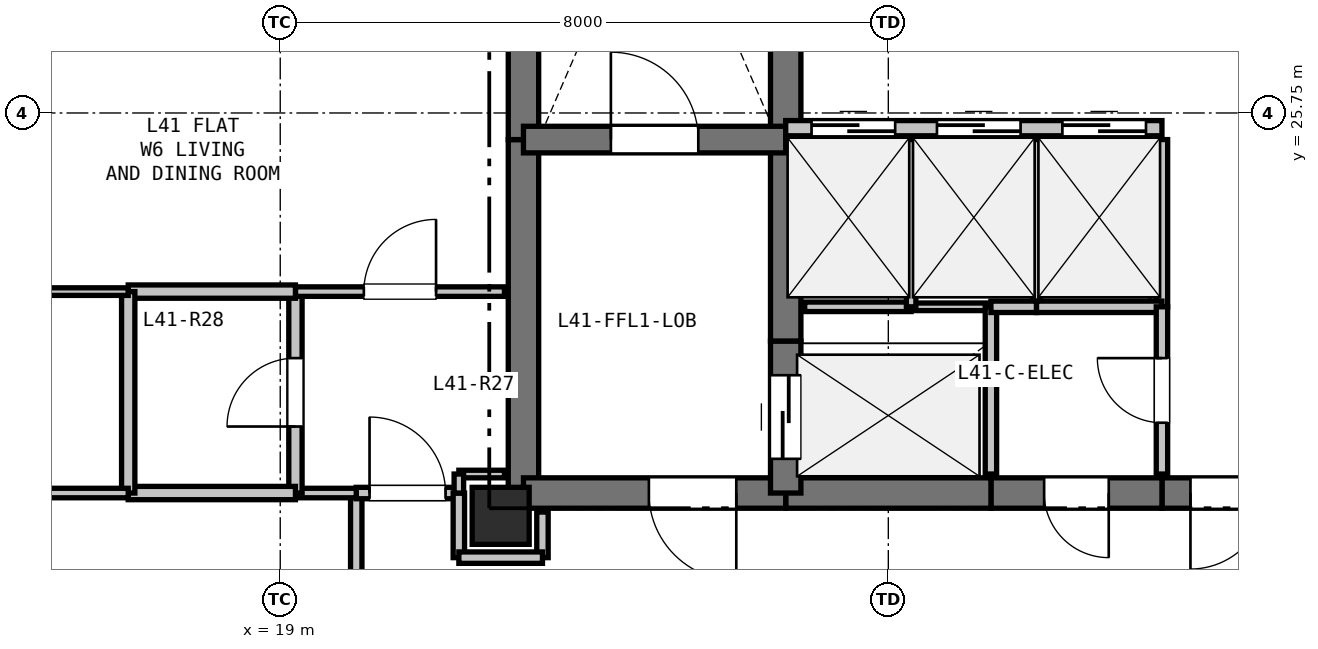
"""IFC4 building model, lengths in metres.
Left out: names, types, materials, properties, quantities, classifications, styles, units other than length and angle.
Written with IfcOpenShell. Run it as: python <this file> out.ifc"""

import sys

from ifc_helpers import new_model, si_unit, direction, frame, frame_2d, origin, origin_2d, place, context, subcontext, project, spatial, rectangle, extrude, element, fill, save


model = new_model("IFC4")
c1 = context("Model", 3, precision=1e-05, world=origin(), true_north=direction((0.0, 1.0)))
c2 = subcontext(c1, "Body", "Model", "MODEL_VIEW")
j1 = project(units=[si_unit("LENGTHUNIT", "METRE"), si_unit("PLANEANGLEUNIT", "RADIAN")], contexts=[c1])
p1 = place(None, origin())
s1 = spatial("IfcSite", under=j1, at=p1, CompositionType="ELEMENT")
p2 = place(p1, origin())
s2 = spatial("IfcBuilding", under=s1, at=p2, CompositionType="ELEMENT")
p3 = place(p2, frame((0.0, 0.0, 147.6)))
s3 = spatial("IfcBuildingStorey", under=s2, at=p3, CompositionType="ELEMENT", Elevation=147.6)
p4 = place(p3, frame((21.9, 20.45, 0.0), z_axis=(0.0, 0.0, 1.0), x_axis=(1.0, 0.0, 0.0)))
e1 = element("IfcColumn", 1, at=p4, inside=s3, PredefinedType="COLUMN", context=c2, shape_type="SweptSolid", body=[
    extrude(rectangle(XDim=0.75, YDim=0.75, at=origin_2d()), origin(), (0.0, 0.0, 1.0), 3.3),
])
p5 = place(p3, frame((16.378, 18.773, 0.0), z_axis=(0.0, 0.0, 1.0), x_axis=(-0.866027848477, 0.499995765644, 0.0)))
e2 = element("IfcWall", 2, at=p5, inside=s3, PredefinedType="SOLIDWALL", context=c2, shape_type="SweptSolid", body=[
    extrude(rectangle(XDim=11.186, YDim=0.25, at=frame_2d((5.593, 0.0))), origin(), (0.0, 0.0, 1.0), 2.68),
])
p6 = place(p5, frame((6.757, 0.0, 0.9)))
e3 = element("IfcOpeningElement", 3, at=p6, cuts=e2, PredefinedType="OPENING", context=c2, shape_type="SweptSolid", body=[
    extrude(rectangle(XDim=1.2, YDim=1.4, at=frame_2d((0.6, 0.7))), frame((0.0, 0.135, 0.0), z_axis=(0.0, -1.0, 0.0), x_axis=(1.0, 0.0, 0.0)), (0.0, 0.0, 1.0), 0.27),
])
p7 = place(p3, frame((22.2, 20.75, 0.0), z_axis=(0.0, 0.0, 1.0), x_axis=(0.0, 1.0, 0.0)))
e4 = element("IfcWall", 4, at=p7, inside=s3, PredefinedType="SHEAR", context=c2, shape_type="SweptSolid", body=[
    extrude(rectangle(XDim=4.65, YDim=0.4, at=frame_2d((2.325, 0.0))), origin(), (0.0, 0.0, 1.0), 3.06),
])
p8 = place(p3, frame((22.2, 25.4, 0.0), z_axis=(0.0, 0.0, 1.0), x_axis=(0.0, 1.0, 0.0)))
e5 = element("IfcWall", 5, at=p8, inside=s3, PredefinedType="SHEAR", context=c2, shape_type="SweptSolid", body=[
    extrude(rectangle(XDim=7.35, YDim=0.4, at=frame_2d((3.675, 0.0))), origin(), (0.0, 0.0, 1.0), 3.06),
])
p9 = place(p3, frame((32.35, 20.75, 0.0), z_axis=(0.0, 0.0, 1.0), x_axis=(-1.0, 0.0, 0.0)))
e6 = element("IfcWall", 6, at=p9, inside=s3, PredefinedType="SHEAR", context=c2, shape_type="SweptSolid", body=[
    extrude(rectangle(XDim=1.75, YDim=0.4, at=frame_2d((0.875, 0.0))), origin(), (0.0, 0.0, 1.0), 3.06),
])
p10 = place(p9, frame((0.375, 0.0, 0.0)))
e7 = element("IfcOpeningElement", 7, at=p10, cuts=e6, PredefinedType="OPENING", context=c2, shape_type="SweptSolid", body=[
    extrude(rectangle(XDim=1.0, YDim=2.15, at=frame_2d((0.5, 1.075))), frame((0.0, 0.21, 0.0), z_axis=(0.0, -1.0, 0.0), x_axis=(1.0, 0.0, 0.0)), (0.0, 0.0, 1.0), 0.42),
])
p11 = place(p3, frame((30.6, 20.75, 0.0), z_axis=(0.0, 0.0, 1.0), x_axis=(-1.0, 0.0, 0.0)))
e8 = element("IfcWall", 8, at=p11, inside=s3, PredefinedType="SHEAR", context=c2, shape_type="SweptSolid", body=[
    extrude(rectangle(XDim=2.25, YDim=0.4, at=frame_2d((1.125, 0.0))), origin(), (0.0, 0.0, 1.0), 3.06),
])
p12 = place(p11, frame((0.7, 0.0, 0.0)))
e9 = element("IfcOpeningElement", 9, at=p12, cuts=e8, PredefinedType="OPENING", context=c2, shape_type="SweptSolid", body=[
    extrude(rectangle(XDim=0.85, YDim=2.1, at=frame_2d((0.425, 1.05))), frame((0.0, 0.21, 0.0), z_axis=(0.0, -1.0, 0.0), x_axis=(1.0, 0.0, 0.0)), (0.0, 0.0, 1.0), 0.42),
])
p13 = place(p3, frame((28.35, 20.75, 0.0), z_axis=(0.0, 0.0, 1.0), x_axis=(-1.0, 0.0, 0.0)))
e10 = element("IfcWall", 10, at=p13, inside=s3, PredefinedType="SHEAR", context=c2, shape_type="SweptSolid", body=[
    extrude(rectangle(XDim=2.7, YDim=0.4, at=frame_2d((1.35, 0.0))), origin(), (0.0, 0.0, 1.0), 3.06),
])
p14 = place(p3, frame((25.65, 20.75, 0.0), z_axis=(0.0, 0.0, 1.0), x_axis=(-1.0, 0.0, 0.0)))
e11 = element("IfcWall", 11, at=p14, inside=s3, PredefinedType="SHEAR", context=c2, shape_type="SweptSolid", body=[
    extrude(rectangle(XDim=3.45, YDim=0.4, at=frame_2d((1.725, 0.0))), origin(), (0.0, 0.0, 1.0), 3.06),
])
p15 = place(p14, frame((0.65, 0.0, 0.0)))
e12 = element("IfcOpeningElement", 12, at=p15, cuts=e11, PredefinedType="OPENING", context=c2, shape_type="SweptSolid", body=[
    extrude(rectangle(XDim=1.15, YDim=2.15, at=frame_2d((0.575, 1.075))), frame((0.0, 0.21, 0.0), z_axis=(0.0, -1.0, 0.0), x_axis=(1.0, 0.0, 0.0)), (0.0, 0.0, 1.0), 0.42),
])
p16 = place(p3, frame((25.65, 20.75, 0.0), z_axis=(0.0, 0.0, 1.0), x_axis=(0.0, 1.0, 0.0)))
e13 = element("IfcWall", 13, at=p16, inside=s3, PredefinedType="SHEAR", context=c2, shape_type="SweptSolid", body=[
    extrude(rectangle(XDim=2.0, YDim=0.4, at=frame_2d((1.0, 0.0))), origin(), (0.0, 0.0, 1.0), 3.06),
])
p17 = place(p16, frame((0.45, 0.0, 0.0)))
e14 = element("IfcOpeningElement", 14, at=p17, cuts=e13, PredefinedType="OPENING", context=c2, shape_type="SweptSolid", body=[
    extrude(rectangle(XDim=1.1, YDim=2.15, at=frame_2d((0.55, 1.075))), frame((0.0, 0.21, 0.0), z_axis=(0.0, -1.0, 0.0), x_axis=(1.0, 0.0, 0.0)), (0.0, 0.0, 1.0), 0.42),
])
p18 = place(p3, frame((25.65, 22.75, 0.0), z_axis=(0.0, 0.0, 1.0), x_axis=(0.0, 1.0, 0.0)))
e15 = element("IfcWall", 15, at=p18, inside=s3, PredefinedType="SHEAR", context=c2, shape_type="SweptSolid", body=[
    extrude(rectangle(XDim=2.8, YDim=0.4, at=frame_2d((1.4, 0.0))), origin(), (0.0, 0.0, 1.0), 3.06),
])
p19 = place(p3, frame((25.65, 25.55, 0.0), z_axis=(0.0, 0.0, 1.0), x_axis=(0.0, 1.0, 0.0)))
e16 = element("IfcWall", 16, at=p19, inside=s3, PredefinedType="SHEAR", context=c2, shape_type="SweptSolid", body=[
    extrude(rectangle(XDim=2.4, YDim=0.4, at=frame_2d((1.2, 0.0))), origin(), (0.0, 0.0, 1.0), 3.06),
])
p20 = place(p3, frame((22.2, 25.4, 0.0), z_axis=(0.0, 0.0, 1.0), x_axis=(1.0, 0.0, 0.0)))
e17 = element("IfcWall", 17, at=p20, inside=s3, PredefinedType="SHEAR", context=c2, shape_type="SweptSolid", body=[
    extrude(rectangle(XDim=3.45, YDim=0.35, at=frame_2d((1.725, 0.0))), origin(), (0.0, 0.0, 1.0), 3.06),
])
p21 = place(p20, frame((1.15, 0.0, 0.0)))
e18 = element("IfcOpeningElement", 18, at=p21, cuts=e17, PredefinedType="OPENING", context=c2, shape_type="SweptSolid", body=[
    extrude(rectangle(XDim=1.15, YDim=2.15, at=frame_2d((0.575, 1.075))), frame((0.0, 0.185, 0.0), z_axis=(0.0, -1.0, 0.0), x_axis=(1.0, 0.0, 0.0)), (0.0, 0.0, 1.0), 0.37),
])
p22 = place(p3, frame((25.65, 25.55, 0.0), z_axis=(0.0, 0.0, 1.0), x_axis=(1.0, 0.0, 0.0)))
e19 = element("IfcWall", 19, at=p22, inside=s3, PredefinedType="PARTITIONING", context=c2, shape_type="SweptSolid", body=[
    extrude(rectangle(XDim=4.95, YDim=0.2, at=frame_2d((2.475, 0.0))), origin(), (0.0, 0.0, 1.0), 3.06),
])
p23 = place(p22, frame((0.34, 0.0, 0.0)))
e20 = element("IfcOpeningElement", 20, at=p23, cuts=e19, PredefinedType="OPENING", context=c2, shape_type="SweptSolid", body=[
    extrude(rectangle(XDim=1.1, YDim=2.15, at=frame_2d((0.55, 1.075))), frame((0.0, 0.11, 0.0), z_axis=(0.0, -1.0, 0.0), x_axis=(1.0, 0.0, 0.0)), (0.0, 0.0, 1.0), 0.22),
])
p24 = place(p22, frame((1.99, 0.0, 0.0)))
e21 = element("IfcOpeningElement", 21, at=p24, cuts=e19, PredefinedType="OPENING", context=c2, shape_type="SweptSolid", body=[
    extrude(rectangle(XDim=1.1, YDim=2.15, at=frame_2d((0.55, 1.075))), frame((0.0, 0.11, 0.0), z_axis=(0.0, -1.0, 0.0), x_axis=(1.0, 0.0, 0.0)), (0.0, 0.0, 1.0), 0.22),
])
p25 = place(p22, frame((3.64, 0.0, 0.0)))
e22 = element("IfcOpeningElement", 22, at=p25, cuts=e19, PredefinedType="OPENING", context=c2, shape_type="SweptSolid", body=[
    extrude(rectangle(XDim=1.1, YDim=2.15, at=frame_2d((0.55, 1.075))), frame((0.0, 0.11, 0.0), z_axis=(0.0, -1.0, 0.0), x_axis=(1.0, 0.0, 0.0)), (0.0, 0.0, 1.0), 0.22),
])
p26 = place(p3, frame((25.9, 23.2, 0.0), z_axis=(0.0, 0.0, 1.0), x_axis=(1.0, 0.0, 0.0)))
e23 = element("IfcWall", 23, at=p26, inside=s3, PredefinedType="PARTITIONING", context=c2, shape_type="SweptSolid", body=[
    extrude(rectangle(XDim=1.4, YDim=0.125, at=frame_2d((0.7, 0.0))), origin(), (0.0, 0.0, 1.0), 3.06),
])
p27 = place(p3, frame((27.3, 23.2, 0.0), z_axis=(0.0, 0.0, 1.0), x_axis=(1.0, 0.0, 0.0)))
e24 = element("IfcWall", 24, at=p27, inside=s3, PredefinedType="PARTITIONING", context=c2, shape_type="SweptSolid", body=[
    extrude(rectangle(XDim=1.05, YDim=0.1, at=frame_2d((0.525, 0.0))), origin(), (0.0, 0.0, 1.0), 3.06),
])
p28 = place(p3, frame((28.35, 23.2, 0.0), z_axis=(0.0, 0.0, 1.0), x_axis=(0.0, -1.0, 0.0)))
e25 = element("IfcWall", 25, at=p28, inside=s3, PredefinedType="PARTITIONING", context=c2, shape_type="SweptSolid", body=[
    extrude(rectangle(XDim=2.2, YDim=0.15, at=frame_2d((1.1, 0.0))), origin(), (0.0, 0.0, 1.0), 3.06),
])
p29 = place(p3, frame((27.3, 25.4, 0.0), z_axis=(0.0, 0.0, 1.0), x_axis=(0.0, -1.0, 0.0)))
e26 = element("IfcWall", 26, at=p29, inside=s3, PredefinedType="PARTITIONING", context=c2, shape_type="SweptSolid", body=[
    extrude(rectangle(XDim=2.2, YDim=0.125, at=frame_2d((1.1, 0.0))), origin(), (0.0, 0.0, 1.0), 3.06),
])
p30 = place(p3, frame((28.95, 25.4, 0.0), z_axis=(0.0, 0.0, 1.0), x_axis=(0.0, -1.0, 0.0)))
e27 = element("IfcWall", 27, at=p30, inside=s3, PredefinedType="PARTITIONING", context=c2, shape_type="SweptSolid", body=[
    extrude(rectangle(XDim=2.2, YDim=0.1, at=frame_2d((1.1, 0.0))), origin(), (0.0, 0.0, 1.0), 3.06),
])
p31 = place(p3, frame((28.95, 23.2, 0.0), z_axis=(0.0, 0.0, 1.0), x_axis=(-1.0, 0.0, 0.0)))
e28 = element("IfcWall", 28, at=p31, inside=s3, PredefinedType="PARTITIONING", context=c2, shape_type="SweptSolid", body=[
    extrude(rectangle(XDim=0.6, YDim=0.15, at=frame_2d((0.3, 0.0))), origin(), (0.0, 0.0, 1.0), 3.06),
])
p32 = place(p3, frame((30.6, 25.4, 0.0), z_axis=(0.0, 0.0, 1.0), x_axis=(0.0, -1.0, 0.0)))
e29 = element("IfcWall", 29, at=p32, inside=s3, PredefinedType="PARTITIONING", context=c2, shape_type="SweptSolid", body=[
    extrude(rectangle(XDim=2.2, YDim=0.15, at=frame_2d((1.1, 0.0))), origin(), (0.0, 0.0, 1.0), 3.06),
])
p33 = place(p3, frame((30.6, 23.2, 0.0), z_axis=(0.0, 0.0, 1.0), x_axis=(-1.0, 0.0, 0.0)))
e30 = element("IfcWall", 30, at=p33, inside=s3, PredefinedType="PARTITIONING", context=c2, shape_type="SweptSolid", body=[
    extrude(rectangle(XDim=1.65, YDim=0.15, at=frame_2d((0.825, 0.0))), origin(), (0.0, 0.0, 1.0), 3.06),
])
p34 = place(p3, frame((30.6, 21.0, 0.0), z_axis=(0.0, 0.0, 1.0), x_axis=(0.0, 1.0, 0.0)))
e31 = element("IfcWall", 31, at=p34, inside=s3, PredefinedType="PARTITIONING", context=c2, shape_type="SweptSolid", body=[
    extrude(rectangle(XDim=2.2, YDim=0.15, at=frame_2d((1.1, 0.0))), origin(), (0.0, 0.0, 1.0), 3.06),
])
p35 = place(p34, frame((0.675, 0.0, 0.0)))
e32 = element("IfcOpeningElement", 32, at=p35, cuts=e31, PredefinedType="OPENING", context=c2, shape_type="SweptSolid", body=[
    extrude(rectangle(XDim=0.85, YDim=2.1, at=frame_2d((0.425, 1.05))), frame((0.0, 0.085, 0.0), z_axis=(0.0, -1.0, 0.0), x_axis=(1.0, 0.0, 0.0)), (0.0, 0.0, 1.0), 0.17),
])
p36 = place(p3, frame((22.45, 19.9, 0.0), z_axis=(0.0, 0.0, 1.0), x_axis=(0.0, 1.0, 0.0)))
e33 = element("IfcWall", 33, at=p36, inside=s3, PredefinedType="PARTITIONING", context=c2, shape_type="SweptSolid", body=[
    extrude(rectangle(XDim=0.6, YDim=0.15, at=frame_2d((0.3, 0.0))), origin(), (0.0, 0.0, 1.0), 2.433),
])
p37 = place(p3, frame((20.0, 18.15, 0.0), z_axis=(0.0, 0.0, 1.0), x_axis=(0.0, 1.0, 0.0)))
e34 = element("IfcWall", 34, at=p37, inside=s3, PredefinedType="PARTITIONING", context=c2, shape_type="SweptSolid", body=[
    extrude(rectangle(XDim=2.6, YDim=0.15, at=frame_2d((1.3, 0.0))), origin(), (0.0, 0.0, 1.0), 3.06),
])
p38 = place(p3, frame((20.0, 20.75, 0.0), z_axis=(0.0, 0.0, 1.0), x_axis=(1.0, 0.0, 0.0)))
e35 = element("IfcWall", 35, at=p38, inside=s3, PredefinedType="PARTITIONING", context=c2, shape_type="SweptSolid", body=[
    extrude(rectangle(XDim=1.35, YDim=0.15, at=frame_2d((0.675, 0.0))), origin(), (0.0, 0.0, 1.0), 2.433),
])
p39 = place(p38, frame((0.175, 0.0, 0.0)))
e36 = element("IfcOpeningElement", 36, at=p39, cuts=e35, PredefinedType="OPENING", context=c2, shape_type="SweptSolid", body=[
    extrude(rectangle(XDim=1.0, YDim=2.15, at=frame_2d((0.5, 1.075))), frame((0.0, 0.085, 0.0), z_axis=(0.0, -1.0, 0.0), x_axis=(1.0, 0.0, 0.0)), (0.0, 0.0, 1.0), 0.17),
])
p40 = place(p3, frame((21.35, 20.75, 0.0), z_axis=(0.0, 0.0, 1.0), x_axis=(0.0, -1.0, 0.0)))
e37 = element("IfcWall", 37, at=p40, inside=s3, PredefinedType="PARTITIONING", context=c2, shape_type="SweptSolid", body=[
    extrude(rectangle(XDim=0.85, YDim=0.15, at=frame_2d((0.425, 0.0))), origin(), (0.0, 0.0, 1.0), 2.433),
])
p41 = place(p3, frame((21.35, 19.9, 0.0), z_axis=(0.0, 0.0, 1.0), x_axis=(1.0, 0.0, 0.0)))
e38 = element("IfcWall", 38, at=p41, inside=s3, PredefinedType="PARTITIONING", context=c2, shape_type="SweptSolid", body=[
    extrude(rectangle(XDim=1.1, YDim=0.15, at=frame_2d((0.55, 0.0))), origin(), (0.0, 0.0, 1.0), 2.433),
])
p42 = place(p3, frame((20.0, 20.75, 0.0), z_axis=(0.0, 0.0, 1.0), x_axis=(-1.0, 0.0, 0.0)))
e39 = element("IfcWall", 39, at=p42, inside=s3, PredefinedType="PARTITIONING", context=c2, shape_type="SweptSolid", body=[
    extrude(rectangle(XDim=0.8, YDim=0.125, at=frame_2d((0.4, 0.0))), origin(), (0.0, 0.0, 1.0), 3.06),
])
p43 = place(p3, frame((19.2, 20.75, 0.0), z_axis=(0.0, 0.0, 1.0), x_axis=(0.0, 1.0, 0.0)))
e40 = element("IfcWall", 40, at=p43, inside=s3, PredefinedType="PLUMBINGWALL", context=c2, shape_type="SweptSolid", body=[
    extrude(rectangle(XDim=2.65, YDim=0.175, at=frame_2d((1.325, 0.0))), origin(), (0.0, 0.0, 1.0), 2.433),
])
p44 = place(p43, frame((0.875, 0.0, 0.0)))
e41 = element("IfcOpeningElement", 41, at=p44, cuts=e40, PredefinedType="OPENING", context=c2, shape_type="SweptSolid", body=[
    extrude(rectangle(XDim=0.9, YDim=2.1, at=frame_2d((0.45, 1.05))), frame((0.0, 0.097, 0.0), z_axis=(0.0, -1.0, 0.0), x_axis=(1.0, 0.0, 0.0)), (0.0, 0.0, 1.0), 0.195),
])
p45 = place(p3, frame((19.2, 23.4, 0.0), z_axis=(0.0, 0.0, 1.0), x_axis=(1.0, 0.0, 0.0)))
e42 = element("IfcWall", 42, at=p45, inside=s3, PredefinedType="PARTITIONING", context=c2, shape_type="SweptSolid", body=[
    extrude(rectangle(XDim=2.75, YDim=0.125, at=frame_2d((1.375, 0.0))), origin(), (0.0, 0.0, 1.0), 2.585),
])
p46 = place(p45, frame((0.9, 0.0, 0.0)))
e43 = element("IfcOpeningElement", 43, at=p46, cuts=e42, PredefinedType="OPENING", context=c2, shape_type="SweptSolid", body=[
    extrude(rectangle(XDim=0.95, YDim=2.1, at=frame_2d((0.475, 1.05))), frame((0.0, 0.073, 0.0), z_axis=(0.0, -1.0, 0.0), x_axis=(1.0, 0.0, 0.0)), (0.0, 0.0, 1.0), 0.145),
])
p47 = place(p3, frame((21.95, 21.0, 0.0), z_axis=(0.0, 0.0, 1.0), x_axis=(-1.0, 0.0, 0.0)))
e44 = element("IfcWall", 44, at=p47, inside=s3, PredefinedType="PARTITIONING", context=c2, shape_type="SweptSolid", body=[
    extrude(rectangle(XDim=0.6, YDim=0.1, at=frame_2d((0.3, 0.0))), origin(), (0.0, 0.0, 1.0), 2.585),
])
p48 = place(p3, frame((21.35, 21.0, 0.0), z_axis=(0.0, 0.0, 1.0), x_axis=(0.0, -1.0, 0.0)))
e45 = element("IfcWall", 45, at=p48, inside=s3, PredefinedType="PARTITIONING", context=c2, shape_type="SweptSolid", body=[
    extrude(rectangle(XDim=0.25, YDim=0.125, at=frame_2d((0.125, 0.0))), origin(), (0.0, 0.0, 1.0), 3.06),
])
for number, where, z_axis, x_axis in (
    (46, (17.0, 23.4, 0.0), (0.0, 0.0, 1.0), (1.0, 0.0, 0.0)),
    (47, (19.2, 20.75, 0.0), (0.0, 0.0, 1.0), (-1.0, 0.0, 0.0)),
):
    element("IfcWall", number, at=place(p3, frame(where, z_axis=z_axis, x_axis=x_axis)), inside=s3, PredefinedType="PLUMBINGWALL", context=c2, shape_type="SweptSolid", body=[
        extrude(rectangle(XDim=2.2, YDim=0.175, at=frame_2d((1.1, 0.0))), origin(), (0.0, 0.0, 1.0), 3.06),
    ])
p49 = place(p3, frame((17.0, 20.75, 0.0), z_axis=(0.0, 0.0, 1.0), x_axis=(0.0, 1.0, 0.0)))
e48 = element("IfcWall", 48, at=p49, inside=s3, PredefinedType="PLUMBINGWALL", context=c2, shape_type="SweptSolid", body=[
    extrude(rectangle(XDim=2.65, YDim=0.175, at=frame_2d((1.325, 0.0))), origin(), (0.0, 0.0, 1.0), 2.433),
])
p50 = place(p3, frame((14.0, 23.4, 0.0), z_axis=(0.0, 0.0, 1.0), x_axis=(1.0, 0.0, 0.0)))
e49 = element("IfcWall", 49, at=p50, inside=s3, PredefinedType="PARTITIONING", context=c2, shape_type="SweptSolid", body=[
    extrude(rectangle(XDim=3.0, YDim=0.1, at=frame_2d((1.5, 0.0))), origin(), (0.0, 0.0, 1.0), 3.06),
])
p51 = place(p50, frame((1.025, 0.0, 0.0)))
e50 = element("IfcOpeningElement", 50, at=p51, cuts=e49, PredefinedType="OPENING", context=c2, shape_type="SweptSolid", body=[
    extrude(rectangle(XDim=0.95, YDim=2.1, at=frame_2d((0.475, 1.05))), frame((0.0, 0.06, 0.0), z_axis=(0.0, -1.0, 0.0), x_axis=(1.0, 0.0, 0.0)), (0.0, 0.0, 1.0), 0.12),
])
p52 = place(p3, frame((17.0, 20.75, 0.0), z_axis=(0.0, 0.0, 1.0), x_axis=(-1.0, 0.0, 0.0)))
e51 = element("IfcWall", 51, at=p52, inside=s3, PredefinedType="PARTITIONING", context=c2, shape_type="SweptSolid", body=[
    extrude(rectangle(XDim=3.0, YDim=0.125, at=frame_2d((1.5, 0.0))), origin(), (0.0, 0.0, 1.0), 2.365),
])
p53 = place(p23, origin())
e52 = element("IfcDoor", 52, at=p53, inside=s3, OperationType="SLIDING_TO_LEFT", PredefinedType="DOOR", context=c2, shape_type="SweptSolid", body=[
    extrude(rectangle(XDim=1.1, YDim=2.15, at=frame_2d((0.55, 1.075))), frame((0.0, 0.025, 0.0), z_axis=(0.0, -1.0, 0.0), x_axis=(1.0, 0.0, 0.0)), (0.0, 0.0, 1.0), 0.05),
])
fill(e20, e52)
p54 = place(p24, origin())
e53 = element("IfcDoor", 53, at=p54, inside=s3, OperationType="SLIDING_TO_LEFT", PredefinedType="DOOR", context=c2, shape_type="SweptSolid", body=[
    extrude(rectangle(XDim=1.1, YDim=2.15, at=frame_2d((0.55, 1.075))), frame((0.0, 0.025, 0.0), z_axis=(0.0, -1.0, 0.0), x_axis=(1.0, 0.0, 0.0)), (0.0, 0.0, 1.0), 0.05),
])
fill(e21, e53)
p55 = place(p25, origin())
e54 = element("IfcDoor", 54, at=p55, inside=s3, OperationType="SLIDING_TO_LEFT", PredefinedType="DOOR", context=c2, shape_type="SweptSolid", body=[
    extrude(rectangle(XDim=1.1, YDim=2.15, at=frame_2d((0.55, 1.075))), frame((0.0, 0.025, 0.0), z_axis=(0.0, -1.0, 0.0), x_axis=(1.0, 0.0, 0.0)), (0.0, 0.0, 1.0), 0.05),
])
fill(e22, e54)
p56 = place(p10, origin())
e55 = element("IfcDoor", 55, at=p56, inside=s3, OperationType="SINGLE_SWING_RIGHT", PredefinedType="DOOR", context=c2, shape_type="SweptSolid", body=[
    extrude(rectangle(XDim=1.0, YDim=2.15, at=frame_2d((0.5, 1.075))), frame((0.0, 0.025, 0.0), z_axis=(0.0, -1.0, 0.0), x_axis=(1.0, 0.0, 0.0)), (0.0, 0.0, 1.0), 0.05),
])
fill(e7, e55)
p57 = place(p17, origin())
e56 = element("IfcDoor", 56, at=p57, inside=s3, OperationType="SLIDING_TO_LEFT", PredefinedType="DOOR", context=c2, shape_type="SweptSolid", body=[
    extrude(rectangle(XDim=1.1, YDim=2.15, at=frame_2d((0.55, 1.075))), frame((0.0, 0.025, 0.0), z_axis=(0.0, -1.0, 0.0), x_axis=(1.0, 0.0, 0.0)), (0.0, 0.0, 1.0), 0.05),
])
fill(e14, e56)
p58 = place(p21, origin())
e57 = element("IfcDoor", 57, at=p58, inside=s3, OperationType="SINGLE_SWING_LEFT", PredefinedType="DOOR", context=c2, shape_type="SweptSolid", body=[
    extrude(rectangle(XDim=1.15, YDim=2.15, at=frame_2d((0.575, 1.075))), frame((0.0, 0.025, 0.0), z_axis=(0.0, -1.0, 0.0), x_axis=(1.0, 0.0, 0.0)), (0.0, 0.0, 1.0), 0.05),
])
fill(e18, e57)
p59 = place(p15, origin())
e58 = element("IfcDoor", 58, at=p59, inside=s3, OperationType="SINGLE_SWING_LEFT", PredefinedType="DOOR", context=c2, shape_type="SweptSolid", body=[
    extrude(rectangle(XDim=1.15, YDim=2.15, at=frame_2d((0.575, 1.075))), frame((0.0, 0.025, 0.0), z_axis=(0.0, -1.0, 0.0), x_axis=(1.0, 0.0, 0.0)), (0.0, 0.0, 1.0), 0.05),
])
fill(e12, e58)
p60 = place(p35, origin())
e59 = element("IfcDoor", 59, at=p60, inside=s3, OperationType="SINGLE_SWING_RIGHT", PredefinedType="DOOR", context=c2, shape_type="SweptSolid", body=[
    extrude(rectangle(XDim=0.85, YDim=2.1, at=frame_2d((0.425, 1.05))), frame((0.0, 0.025, 0.0), z_axis=(0.0, -1.0, 0.0), x_axis=(1.0, 0.0, 0.0)), (0.0, 0.0, 1.0), 0.05),
])
fill(e32, e59)
p61 = place(p39, origin())
e60 = element("IfcDoor", 60, at=p61, inside=s3, OperationType="SINGLE_SWING_LEFT", PredefinedType="DOOR", context=c2, shape_type="SweptSolid", body=[
    extrude(rectangle(XDim=1.0, YDim=2.15, at=frame_2d((0.5, 1.075))), frame((0.0, 0.025, 0.0), z_axis=(0.0, -1.0, 0.0), x_axis=(1.0, 0.0, 0.0)), (0.0, 0.0, 1.0), 0.05),
])
fill(e36, e60)
p62 = place(p12, origin())
e61 = element("IfcDoor", 61, at=p62, inside=s3, OperationType="SINGLE_SWING_LEFT", PredefinedType="DOOR", context=c2, shape_type="SweptSolid", body=[
    extrude(rectangle(XDim=0.85, YDim=2.1, at=frame_2d((0.425, 1.05))), frame((0.0, 0.025, 0.0), z_axis=(0.0, -1.0, 0.0), x_axis=(1.0, 0.0, 0.0)), (0.0, 0.0, 1.0), 0.05),
])
fill(e9, e61)
p63 = place(p44, origin())
e62 = element("IfcDoor", 62, at=p63, inside=s3, OperationType="SINGLE_SWING_LEFT", PredefinedType="DOOR", context=c2, shape_type="SweptSolid", body=[
    extrude(rectangle(XDim=0.9, YDim=2.1, at=frame_2d((0.45, 1.05))), frame((0.0, 0.025, 0.0), z_axis=(0.0, -1.0, 0.0), x_axis=(1.0, 0.0, 0.0)), (0.0, 0.0, 1.0), 0.05),
])
fill(e41, e62)
p64 = place(p46, origin())
e63 = element("IfcDoor", 63, at=p64, inside=s3, OperationType="SINGLE_SWING_RIGHT", PredefinedType="DOOR", context=c2, shape_type="SweptSolid", body=[
    extrude(rectangle(XDim=0.95, YDim=2.1, at=frame_2d((0.475, 1.05))), frame((0.0, 0.025, 0.0), z_axis=(0.0, -1.0, 0.0), x_axis=(1.0, 0.0, 0.0)), (0.0, 0.0, 1.0), 0.05),
])
fill(e43, e63)
save(model, sys.argv[1])
